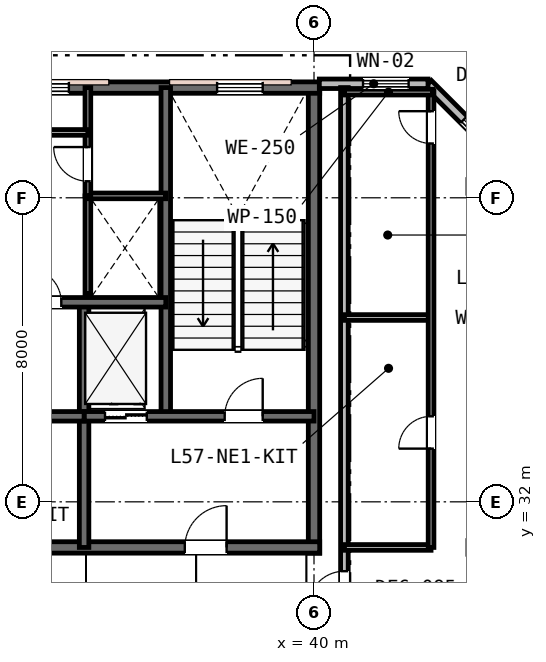
"""IFC4 building model, lengths in metres.
Left out: names, types, materials, properties, quantities, classifications, styles, units other than length and angle.
Written with IfcOpenShell. Run it as: python <this file> out.ifc"""

import sys

from ifc_helpers import new_model, si_unit, direction, frame, frame_2d, origin, place, context, subcontext, project, spatial, rectangle, extrude, element, fill, save


model = new_model("IFC4")
c1 = context("Model", 3, precision=1e-05, world=origin(), true_north=direction((0.0, 1.0)))
c2 = subcontext(c1, "Body", "Model", "MODEL_VIEW")
j1 = project(units=[si_unit("LENGTHUNIT", "METRE"), si_unit("PLANEANGLEUNIT", "RADIAN")], contexts=[c1])
p1 = place(None, origin())
s1 = spatial("IfcSite", under=j1, at=p1, CompositionType="ELEMENT")
p2 = place(p1, origin())
s2 = spatial("IfcBuilding", under=s1, at=p2, CompositionType="ELEMENT")
p3 = place(p2, frame((0.0, 0.0, 222.2)))
s3 = spatial("IfcBuildingStorey", under=s2, at=p3, CompositionType="ELEMENT", Elevation=222.2)
p4 = place(p3, frame((40.0, 30.65, 0.0), z_axis=(0.0, 0.0, 1.0), x_axis=(0.0, 1.0, 0.0)))
e1 = element("IfcWall", 1, at=p4, inside=s3, PredefinedType="SHEAR", context=c2, shape_type="SweptSolid", body=[
    extrude(rectangle(XDim=12.3, YDim=0.3, at=frame_2d((6.15, 0.0))), origin(), (0.0, 0.0, 1.0), 3.8),
])
p5 = place(p3, frame((15.85, 42.9, 0.0), z_axis=(0.0, 0.0, 1.0), x_axis=(1.0, 0.0, 0.0)))
e2 = element("IfcWall", 2, at=p5, inside=s3, PredefinedType="SHEAR", context=c2, shape_type="SweptSolid", body=[
    extrude(rectangle(XDim=24.3, YDim=0.3, at=frame_2d((12.15, 0.0))), origin(), (0.0, 0.0, 1.0), 3.8),
])
p6 = place(p5, frame((1.6, 0.0, 0.95)))
e3 = element("IfcOpeningElement", 3, at=p6, cuts=e2, PredefinedType="OPENING", context=c2, shape_type="SweptSolid", body=[
    extrude(rectangle(XDim=1.2, YDim=1.6, at=frame_2d((0.6, 0.8))), frame((0.0, 0.16, 0.0), z_axis=(0.0, -1.0, 0.0), x_axis=(1.0, 0.0, 0.0)), (0.0, 0.0, 1.0), 0.32),
])
p7 = place(p5, frame((16.5, 0.0, 0.95)))
e4 = element("IfcOpeningElement", 4, at=p7, cuts=e2, PredefinedType="OPENING", context=c2, shape_type="SweptSolid", body=[
    extrude(rectangle(XDim=1.2, YDim=1.6, at=frame_2d((0.6, 0.8))), frame((0.0, 0.16, 0.0), z_axis=(0.0, -1.0, 0.0), x_axis=(1.0, 0.0, 0.0)), (0.0, 0.0, 1.0), 0.32),
])
p8 = place(p5, frame((21.6, 0.0, 0.95)))
e5 = element("IfcOpeningElement", 5, at=p8, cuts=e2, PredefinedType="OPENING", context=c2, shape_type="SweptSolid", body=[
    extrude(rectangle(XDim=1.2, YDim=1.6, at=frame_2d((0.6, 0.8))), frame((0.0, 0.16, 0.0), z_axis=(0.0, -1.0, 0.0), x_axis=(1.0, 0.0, 0.0)), (0.0, 0.0, 1.0), 0.32),
])
p9 = place(p3, frame((28.95, 30.8, 0.0), z_axis=(0.0, 0.0, 1.0), x_axis=(1.0, 0.0, 0.0)))
e6 = element("IfcWall", 6, at=p9, inside=s3, PredefinedType="SHEAR", context=c2, shape_type="SweptSolid", body=[
    extrude(rectangle(XDim=11.2, YDim=0.3, at=frame_2d((5.6, 0.0))), origin(), (0.0, 0.0, 1.0), 3.8),
])
p10 = place(p9, frame((7.65, 0.0, 0.0)))
e7 = element("IfcOpeningElement", 7, at=p10, cuts=e6, PredefinedType="OPENING", context=c2, shape_type="SweptSolid", body=[
    extrude(rectangle(XDim=1.1, YDim=2.15, at=frame_2d((0.55, 1.075))), frame((0.0, 0.16, 0.0), z_axis=(0.0, -1.0, 0.0), x_axis=(1.0, 0.0, 0.0)), (0.0, 0.0, 1.0), 0.32),
])
p11 = place(p3, frame((36.1, 34.25, 0.0), z_axis=(0.0, 0.0, 1.0), x_axis=(0.0, 1.0, 0.0)))
e8 = element("IfcWall", 8, at=p11, inside=s3, PredefinedType="SHEAR", context=c2, shape_type="SweptSolid", body=[
    extrude(rectangle(XDim=8.65, YDim=0.25, at=frame_2d((4.325, 0.0))), origin(), (0.0, 0.0, 1.0), 3.8),
])
p12 = place(p3, frame((33.95, 30.8, 0.0), z_axis=(0.0, 0.0, 1.0), x_axis=(0.0, 1.0, 0.0)))
e9 = element("IfcWall", 9, at=p12, inside=s3, PredefinedType="SHEAR", context=c2, shape_type="SweptSolid", body=[
    extrude(rectangle(XDim=6.45, YDim=0.25, at=frame_2d((3.225, 0.0))), origin(), (0.0, 0.0, 1.0), 3.8),
])
p13 = place(p3, frame((33.95, 34.25, 0.0), z_axis=(0.0, 0.0, 1.0), x_axis=(1.0, 0.0, 0.0)))
e10 = element("IfcWall", 10, at=p13, inside=s3, PredefinedType="SHEAR", context=c2, shape_type="SweptSolid", body=[
    extrude(rectangle(XDim=6.05, YDim=0.25, at=frame_2d((3.025, 0.0))), origin(), (0.0, 0.0, 1.0), 3.8),
])
p14 = place(p13, frame((3.7, 0.0, 0.0)))
e11 = element("IfcOpeningElement", 11, at=p14, cuts=e10, PredefinedType="OPENING", context=c2, shape_type="SweptSolid", body=[
    extrude(rectangle(XDim=1.0, YDim=2.15, at=frame_2d((0.5, 1.075))), frame((0.0, 0.135, 0.0), z_axis=(0.0, -1.0, 0.0), x_axis=(1.0, 0.0, 0.0)), (0.0, 0.0, 1.0), 0.27),
])
p15 = place(p13, frame((0.55, 0.0, 0.0)))
e12 = element("IfcOpeningElement", 12, at=p15, cuts=e10, PredefinedType="OPENING", context=c2, shape_type="SweptSolid", body=[
    extrude(rectangle(XDim=1.1, YDim=2.15, at=frame_2d((0.55, 1.075))), frame((0.0, 0.135, 0.0), z_axis=(0.0, -1.0, 0.0), x_axis=(1.0, 0.0, 0.0)), (0.0, 0.0, 1.0), 0.27),
])
p16 = place(p3, frame((28.95, 34.25, 0.0), z_axis=(0.0, 0.0, 1.0), x_axis=(1.0, 0.0, 0.0)))
e13 = element("IfcWall", 13, at=p16, inside=s3, PredefinedType="SHEAR", context=c2, shape_type="SweptSolid", body=[
    extrude(rectangle(XDim=5.0, YDim=0.25, at=frame_2d((2.5, 0.0))), origin(), (0.0, 0.0, 1.0), 3.8),
])
p17 = place(p16, frame((1.95, 0.0, 0.0)))
e14 = element("IfcOpeningElement", 14, at=p17, cuts=e13, PredefinedType="OPENING", context=c2, shape_type="SweptSolid", body=[
    extrude(rectangle(XDim=1.0, YDim=2.15, at=frame_2d((0.5, 1.075))), frame((0.0, 0.135, 0.0), z_axis=(0.0, -1.0, 0.0), x_axis=(1.0, 0.0, 0.0)), (0.0, 0.0, 1.0), 0.27),
])
p18 = place(p3, frame((19.9, 37.25, 0.0), z_axis=(0.0, 0.0, 1.0), x_axis=(1.0, 0.0, 0.0)))
e15 = element("IfcWall", 15, at=p18, inside=s3, PredefinedType="SHEAR", context=c2, shape_type="SweptSolid", body=[
    extrude(rectangle(XDim=16.2, YDim=0.25, at=frame_2d((8.1, 0.0))), origin(), (0.0, 0.0, 1.0), 3.8),
])
p19 = place(p18, frame((12.55, 0.0, 0.0)))
e16 = element("IfcOpeningElement", 16, at=p19, cuts=e15, PredefinedType="OPENING", context=c2, shape_type="SweptSolid", body=[
    extrude(rectangle(XDim=0.9, YDim=2.15, at=frame_2d((0.45, 1.075))), frame((0.0, 0.135, 0.0), z_axis=(0.0, -1.0, 0.0), x_axis=(1.0, 0.0, 0.0)), (0.0, 0.0, 1.0), 0.27),
])
p20 = place(p18, frame((2.5, 0.0, 0.0)))
e17 = element("IfcOpeningElement", 17, at=p20, cuts=e15, PredefinedType="OPENING", context=c2, shape_type="SweptSolid", body=[
    extrude(rectangle(XDim=1.05, YDim=2.15, at=frame_2d((0.525, 1.075))), frame((0.0, 0.135, 0.0), z_axis=(0.0, -1.0, 0.0), x_axis=(1.0, 0.0, 0.0)), (0.0, 0.0, 1.0), 0.27),
])
p21 = place(p18, frame((4.4, 0.0, 0.0)))
e18 = element("IfcOpeningElement", 18, at=p21, cuts=e15, PredefinedType="OPENING", context=c2, shape_type="SweptSolid", body=[
    extrude(rectangle(XDim=1.05, YDim=2.15, at=frame_2d((0.525, 1.075))), frame((0.0, 0.135, 0.0), z_axis=(0.0, -1.0, 0.0), x_axis=(1.0, 0.0, 0.0)), (0.0, 0.0, 1.0), 0.27),
])
p22 = place(p18, frame((6.3, 0.0, 0.0)))
e19 = element("IfcOpeningElement", 19, at=p22, cuts=e15, PredefinedType="OPENING", context=c2, shape_type="SweptSolid", body=[
    extrude(rectangle(XDim=1.05, YDim=2.15, at=frame_2d((0.525, 1.075))), frame((0.0, 0.135, 0.0), z_axis=(0.0, -1.0, 0.0), x_axis=(1.0, 0.0, 0.0)), (0.0, 0.0, 1.0), 0.27),
])
p23 = place(p3, frame((46.0, 40.0, 0.0), z_axis=(0.0, 0.0, 1.0), x_axis=(-0.707106781187, 0.707106781187, 0.0)))
e20 = element("IfcWall", 20, at=p23, inside=s3, PredefinedType="STANDARD", context=c2, shape_type="SweptSolid", body=[
    extrude(rectangle(XDim=4.243, YDim=0.25, at=frame_2d((2.121, 0.0))), origin(), (0.0, 0.0, 1.0), 3.53),
])
p24 = place(p23, frame((1.111, 0.0, 0.75)))
e21 = element("IfcOpeningElement", 21, at=p24, cuts=e20, PredefinedType="OPENING", context=c2, shape_type="SweptSolid", body=[
    extrude(rectangle(XDim=1.8, YDim=1.85, at=frame_2d((0.9, 0.925))), frame((0.0, 0.135, 0.0), z_axis=(0.0, -1.0, 0.0), x_axis=(1.0, 0.0, 0.0)), (0.0, 0.0, 1.0), 0.27),
])
p25 = place(p3, frame((43.0, 43.0, 0.0), z_axis=(0.0, 0.0, 1.0), x_axis=(-1.0, 0.0, 0.0)))
e22 = element("IfcWall", 22, at=p25, inside=s3, PredefinedType="STANDARD", context=c2, shape_type="SweptSolid", body=[
    extrude(rectangle(XDim=2.86, YDim=0.25, at=frame_2d((1.43, 0.0))), origin(), (0.0, 0.0, 1.0), 3.53),
])
p26 = place(p25, frame((0.51, 0.0, 0.85)))
e23 = element("IfcOpeningElement", 23, at=p26, cuts=e22, PredefinedType="OPENING", context=c2, shape_type="SweptSolid", body=[
    extrude(rectangle(XDim=1.2, YDim=1.6, at=frame_2d((0.6, 0.8))), frame((0.0, 0.135, 0.0), z_axis=(0.0, -1.0, 0.0), x_axis=(1.0, 0.0, 0.0)), (0.0, 0.0, 1.0), 0.27),
])
p27 = place(p3, frame((34.05, 37.473, 0.0), z_axis=(0.0, 0.0, 1.0), x_axis=(0.0, 1.0, 0.0)))
e24 = element("IfcWall", 24, at=p27, inside=s3, PredefinedType="PLUMBINGWALL", context=c2, shape_type="SweptSolid", body=[
    extrude(rectangle(XDim=2.577, YDim=0.15, at=frame_2d((1.288, 0.0))), origin(), (0.0, 0.0, 1.0), 3.53),
])
p28 = place(p3, frame((34.05, 40.05, 0.0), z_axis=(0.0, 0.0, 1.0), x_axis=(1.0, 0.0, 0.0)))
e25 = element("IfcWall", 25, at=p28, inside=s3, PredefinedType="PARTITIONING", context=c2, shape_type="SweptSolid", body=[
    extrude(rectangle(XDim=2.05, YDim=0.15, at=frame_2d((1.025, 0.0))), origin(), (0.0, 0.0, 1.0), 3.53),
])
p29 = place(p3, frame((34.05, 40.05, 0.0), z_axis=(0.0, 0.0, 1.0), x_axis=(0.0, 1.0, 0.0)))
e26 = element("IfcWall", 26, at=p29, inside=s3, PredefinedType="PARTITIONING", context=c2, shape_type="SweptSolid", body=[
    extrude(rectangle(XDim=2.85, YDim=0.15, at=frame_2d((1.425, 0.0))), origin(), (0.0, 0.0, 1.0), 3.53),
])
p30 = place(p29, frame((0.385, 0.0, 0.0)))
e27 = element("IfcOpeningElement", 27, at=p30, cuts=e26, PredefinedType="OPENING", context=c2, shape_type="SweptSolid", body=[
    extrude(rectangle(XDim=0.9, YDim=2.15, at=frame_2d((0.45, 1.075))), frame((0.0, 0.085, 0.0), z_axis=(0.0, -1.0, 0.0), x_axis=(1.0, 0.0, 0.0)), (0.0, 0.0, 1.0), 0.17),
])
p31 = place(p3, frame((22.08, 41.72, 0.0), z_axis=(0.0, 0.0, 1.0), x_axis=(1.0, 0.0, 0.0)))
e28 = element("IfcWall", 28, at=p31, inside=s3, PredefinedType="PARTITIONING", context=c2, shape_type="SweptSolid", body=[
    extrude(rectangle(XDim=11.97, YDim=0.15, at=frame_2d((5.985, 0.0))), origin(), (0.0, 0.0, 1.0), 3.53),
])
p32 = place(p31, frame((5.535, 0.0, 0.0)))
e29 = element("IfcOpeningElement", 29, at=p32, cuts=e28, PredefinedType="OPENING", context=c2, shape_type="SweptSolid", body=[
    extrude(rectangle(XDim=0.9, YDim=2.15, at=frame_2d((0.45, 1.075))), frame((0.0, 0.085, 0.0), z_axis=(0.0, -1.0, 0.0), x_axis=(1.0, 0.0, 0.0)), (0.0, 0.0, 1.0), 0.17),
])
p33 = place(p3, frame((40.8, 28.6, 0.0), z_axis=(0.0, 0.0, 1.0), x_axis=(0.0, 1.0, 0.0)))
e30 = element("IfcWall", 30, at=p33, inside=s3, PredefinedType="PARTITIONING", context=c2, shape_type="SweptSolid", body=[
    extrude(rectangle(XDim=14.3, YDim=0.2, at=frame_2d((7.15, 0.0))), origin(), (0.0, 0.0, 1.0), 2.92),
])
p34 = place(p33, frame((0.625, 0.0, 0.0)))
e31 = element("IfcOpeningElement", 31, at=p34, cuts=e30, PredefinedType="OPENING", context=c2, shape_type="SweptSolid", body=[
    extrude(rectangle(XDim=0.95, YDim=2.15, at=frame_2d((0.475, 1.075))), frame((0.0, 0.11, 0.0), z_axis=(0.0, -1.0, 0.0), x_axis=(1.0, 0.0, 0.0)), (0.0, 0.0, 1.0), 0.22),
])
p35 = place(p3, frame((40.8, 30.8, 0.0), z_axis=(0.0, 0.0, 1.0), x_axis=(1.0, 0.0, 0.0)))
e32 = element("IfcWall", 32, at=p35, inside=s3, PredefinedType="PARTITIONING", context=c2, shape_type="SweptSolid", body=[
    extrude(rectangle(XDim=2.28, YDim=0.15, at=frame_2d((1.14, 0.0))), origin(), (0.0, 0.0, 1.0), 2.92),
])
p36 = place(p3, frame((40.8, 36.85, 0.0), z_axis=(0.0, 0.0, 1.0), x_axis=(1.0, 0.0, 0.0)))
e33 = element("IfcWall", 33, at=p36, inside=s3, PredefinedType="PARTITIONING", context=c2, shape_type="SweptSolid", body=[
    extrude(rectangle(XDim=2.28, YDim=0.15, at=frame_2d((1.14, 0.0))), origin(), (0.0, 0.0, 1.0), 3.53),
])
p37 = place(p3, frame((43.08, 30.8, 0.0), z_axis=(0.0, 0.0, 1.0), x_axis=(0.0, 1.0, 0.0)))
e34 = element("IfcWall", 34, at=p37, inside=s3, PredefinedType="PARTITIONING", context=c2, shape_type="SweptSolid", body=[
    extrude(rectangle(XDim=12.02, YDim=0.15, at=frame_2d((6.01, 0.0))), origin(), (0.0, 0.0, 1.0), 2.92),
])
p38 = place(p37, frame((2.6, 0.0, 0.0)))
e35 = element("IfcOpeningElement", 35, at=p38, cuts=e34, PredefinedType="OPENING", context=c2, shape_type="SweptSolid", body=[
    extrude(rectangle(XDim=0.85, YDim=2.15, at=frame_2d((0.425, 1.075))), frame((0.0, 0.085, 0.0), z_axis=(0.0, -1.0, 0.0), x_axis=(1.0, 0.0, 0.0)), (0.0, 0.0, 1.0), 0.17),
])
p39 = place(p37, frame((10.629, 0.0, 0.0)))
e36 = element("IfcOpeningElement", 36, at=p39, cuts=e34, PredefinedType="OPENING", context=c2, shape_type="SweptSolid", body=[
    extrude(rectangle(XDim=0.85, YDim=2.15, at=frame_2d((0.425, 1.075))), frame((0.0, 0.085, 0.0), z_axis=(0.0, -1.0, 0.0), x_axis=(1.0, 0.0, 0.0)), (0.0, 0.0, 1.0), 0.17),
])
p40 = place(p3, frame((40.8, 42.78, 0.0), z_axis=(0.0, 0.0, 1.0), x_axis=(1.0, 0.0, 0.0)))
e37 = element("IfcWall", 37, at=p40, inside=s3, PredefinedType="PARTITIONING", context=c2, shape_type="SweptSolid", body=[
    extrude(rectangle(XDim=2.32, YDim=0.15, at=frame_2d((1.16, 0.0))), origin(), (0.0, 0.0, 1.0), 3.53),
])
p41 = place(p7, origin())
e38 = element("IfcWindow", 38, at=p41, inside=s3, PartitioningType="SINGLE_PANEL", PredefinedType="WINDOW", context=c2, shape_type="SweptSolid", body=[
    extrude(rectangle(XDim=1.2, YDim=1.6, at=frame_2d((0.6, 0.8))), frame((0.0, 0.03, 0.0), z_axis=(0.0, -1.0, 0.0), x_axis=(1.0, 0.0, 0.0)), (0.0, 0.0, 1.0), 0.06),
])
fill(e4, e38)
p42 = place(p8, origin())
e39 = element("IfcWindow", 39, at=p42, inside=s3, PartitioningType="SINGLE_PANEL", PredefinedType="WINDOW", context=c2, shape_type="SweptSolid", body=[
    extrude(rectangle(XDim=1.2, YDim=1.6, at=frame_2d((0.6, 0.8))), frame((0.0, 0.03, 0.0), z_axis=(0.0, -1.0, 0.0), x_axis=(1.0, 0.0, 0.0)), (0.0, 0.0, 1.0), 0.06),
])
fill(e5, e39)
p43 = place(p24, origin())
e40 = element("IfcWindow", 40, at=p43, inside=s3, PartitioningType="SINGLE_PANEL", PredefinedType="WINDOW", context=c2, shape_type="SweptSolid", body=[
    extrude(rectangle(XDim=1.8, YDim=1.85, at=frame_2d((0.9, 0.925))), frame((0.0, 0.03, 0.0), z_axis=(0.0, -1.0, 0.0), x_axis=(1.0, 0.0, 0.0)), (0.0, 0.0, 1.0), 0.06),
])
fill(e21, e40)
p44 = place(p26, origin())
e41 = element("IfcWindow", 41, at=p44, inside=s3, PartitioningType="SINGLE_PANEL", PredefinedType="WINDOW", context=c2, shape_type="SweptSolid", body=[
    extrude(rectangle(XDim=1.2, YDim=1.6, at=frame_2d((0.6, 0.8))), frame((0.0, 0.03, 0.0), z_axis=(0.0, -1.0, 0.0), x_axis=(1.0, 0.0, 0.0)), (0.0, 0.0, 1.0), 0.06),
])
fill(e23, e41)
p45 = place(p14, origin())
e42 = element("IfcDoor", 42, at=p45, inside=s3, OperationType="SINGLE_SWING_RIGHT", PredefinedType="DOOR", context=c2, shape_type="SweptSolid", body=[
    extrude(rectangle(XDim=1.0, YDim=2.15, at=frame_2d((0.5, 1.075))), frame((0.0, 0.025, 0.0), z_axis=(0.0, -1.0, 0.0), x_axis=(1.0, 0.0, 0.0)), (0.0, 0.0, 1.0), 0.05),
])
fill(e11, e42)
p46 = place(p10, origin())
e43 = element("IfcDoor", 43, at=p46, inside=s3, OperationType="SINGLE_SWING_RIGHT", PredefinedType="DOOR", context=c2, shape_type="SweptSolid", body=[
    extrude(rectangle(XDim=1.1, YDim=2.15, at=frame_2d((0.55, 1.075))), frame((0.0, 0.025, 0.0), z_axis=(0.0, -1.0, 0.0), x_axis=(1.0, 0.0, 0.0)), (0.0, 0.0, 1.0), 0.05),
])
fill(e7, e43)
p47 = place(p19, origin())
e44 = element("IfcDoor", 44, at=p47, inside=s3, OperationType="SINGLE_SWING_LEFT", PredefinedType="DOOR", context=c2, shape_type="SweptSolid", body=[
    extrude(rectangle(XDim=0.9, YDim=2.15, at=frame_2d((0.45, 1.075))), frame((0.0, 0.025, 0.0), z_axis=(0.0, -1.0, 0.0), x_axis=(1.0, 0.0, 0.0)), (0.0, 0.0, 1.0), 0.05),
])
fill(e16, e44)
p48 = place(p30, origin())
e45 = element("IfcDoor", 45, at=p48, inside=s3, OperationType="SINGLE_SWING_RIGHT", PredefinedType="DOOR", context=c2, shape_type="SweptSolid", body=[
    extrude(rectangle(XDim=0.9, YDim=2.15, at=frame_2d((0.45, 1.075))), frame((0.0, 0.025, 0.0), z_axis=(0.0, -1.0, 0.0), x_axis=(1.0, 0.0, 0.0)), (0.0, 0.0, 1.0), 0.05),
])
fill(e27, e45)
p49 = place(p34, origin())
e46 = element("IfcDoor", 46, at=p49, inside=s3, OperationType="SINGLE_SWING_LEFT", PredefinedType="DOOR", context=c2, shape_type="SweptSolid", body=[
    extrude(rectangle(XDim=0.95, YDim=2.15, at=frame_2d((0.475, 1.075))), frame((0.0, 0.025, 0.0), z_axis=(0.0, -1.0, 0.0), x_axis=(1.0, 0.0, 0.0)), (0.0, 0.0, 1.0), 0.05),
])
fill(e31, e46)
p50 = place(p38, origin())
e47 = element("IfcDoor", 47, at=p50, inside=s3, OperationType="SINGLE_SWING_LEFT", PredefinedType="DOOR", context=c2, shape_type="SweptSolid", body=[
    extrude(rectangle(XDim=0.85, YDim=2.15, at=frame_2d((0.425, 1.075))), frame((0.0, 0.025, 0.0), z_axis=(0.0, -1.0, 0.0), x_axis=(1.0, 0.0, 0.0)), (0.0, 0.0, 1.0), 0.05),
])
fill(e35, e47)
p51 = place(p39, origin())
e48 = element("IfcDoor", 48, at=p51, inside=s3, OperationType="SINGLE_SWING_RIGHT", PredefinedType="DOOR", context=c2, shape_type="SweptSolid", body=[
    extrude(rectangle(XDim=0.85, YDim=2.15, at=frame_2d((0.425, 1.075))), frame((0.0, 0.025, 0.0), z_axis=(0.0, -1.0, 0.0), x_axis=(1.0, 0.0, 0.0)), (0.0, 0.0, 1.0), 0.05),
])
fill(e36, e48)
p52 = place(p15, origin())
e49 = element("IfcDoor", 49, at=p52, inside=s3, OperationType="DOUBLE_DOOR_SLIDING", PredefinedType="DOOR", context=c2, shape_type="SweptSolid", body=[
    extrude(rectangle(XDim=1.1, YDim=2.15, at=frame_2d((0.55, 1.075))), frame((0.0, 0.025, 0.0), z_axis=(0.0, -1.0, 0.0), x_axis=(1.0, 0.0, 0.0)), (0.0, 0.0, 1.0), 0.05),
])
fill(e12, e49)
save(model, sys.argv[1])
